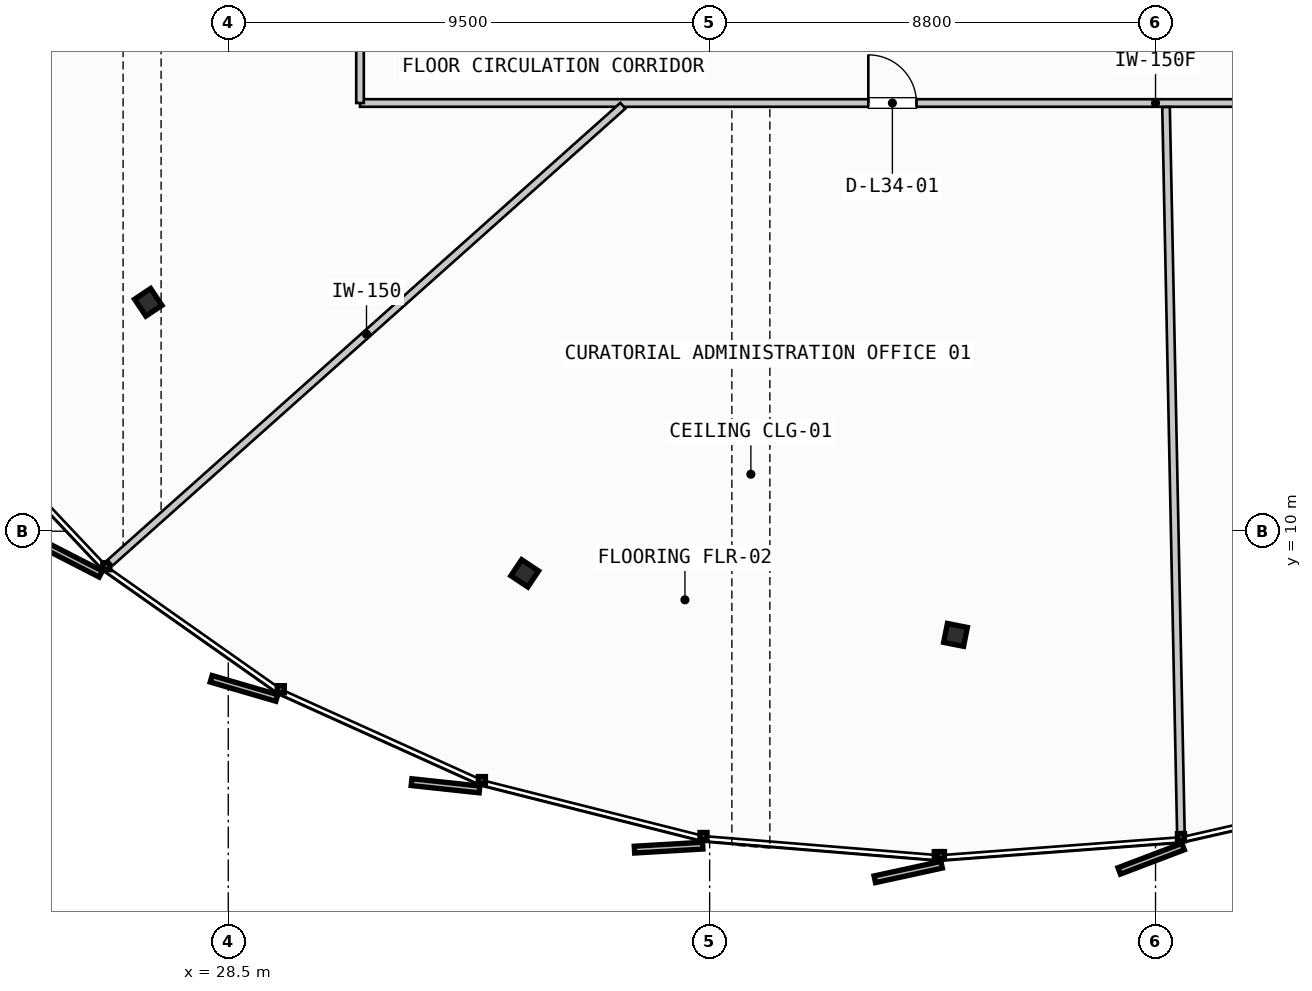
"""IFC4 building model, lengths in metres.
Left out: names, types, materials, properties, quantities, classifications, styles, units other than length and angle.
Written with IfcOpenShell. Run it as: python <this file> out.ifc"""

import sys

from ifc_helpers import new_model, si_unit, direction, frame, frame_2d, origin, origin_2d, place, context, subcontext, project, spatial, rectangle, i_section, extrude, source, transform, mapped, element, fill, save


model = new_model("IFC4")
c1 = context("Model", 3, precision=1e-05, world=origin(), true_north=direction((0.0, 1.0)))
c2 = subcontext(c1, "Body", "Model", "MODEL_VIEW")
j1 = project(units=[si_unit("LENGTHUNIT", "METRE"), si_unit("PLANEANGLEUNIT", "RADIAN")], contexts=[c1])
p1 = place(None, origin())
s1 = spatial("IfcSite", under=j1, at=p1, CompositionType="ELEMENT")
p2 = place(p1, origin())
s2 = spatial("IfcBuilding", under=s1, at=p2, CompositionType="ELEMENT")
p3 = place(p2, frame((0.0, 0.0, 135.9)))
s3 = spatial("IfcBuildingStorey", under=s2, at=p3, CompositionType="ELEMENT", Elevation=135.9)
m1 = source(origin(), c2, "Body", "SweptSolid", [
    extrude(i_section(OverallWidth=0.401, OverallDepth=0.381, WebThickness=0.032, FlangeThickness=0.051, FilletRadius=0.015, at=origin_2d()), origin(), (0.0, 0.0, 1.0), 3.3),
])
for number, where, z_axis, x_axis in (
    (1, (26.921, 14.517, 0.0), (0.0, 0.0, 1.0), (-0.831, -0.556, 0.0)),
    (2, (34.351, 9.168, 0.0), (0.0, 0.0, 1.0), (-0.556, -0.831, 0.0)),
    (3, (42.852, 7.954, 0.0), (0.0, 0.0, 1.0), (-0.195, -0.981, 0.0)),
):
    element("IfcColumn", number, at=place(p3, frame(where, z_axis=z_axis, x_axis=x_axis)), inside=s3, PredefinedType="COLUMN", context=c2, shape_type="MappedRepresentation", body=[
        mapped(m1, transform((0.0, 0.0, 0.0), scale=1.0)),
    ])
p4 = place(p3, frame((31.1, 18.45, 0.0), z_axis=(0.0, 0.0, 1.0), x_axis=(1.0, 0.0, 0.0)))
e4 = element("IfcWall", 4, at=p4, inside=s3, PredefinedType="PARTITIONING", context=c2, shape_type="SweptSolid", body=[
    extrude(rectangle(XDim=31.4, YDim=0.15, at=frame_2d((15.7, 0.0))), origin(), (0.0, 0.0, 1.0), 2.445),
])
p5 = place(p4, frame((10.031, 0.0, 0.0)))
e5 = element("IfcOpeningElement", 5, at=p5, cuts=e4, PredefinedType="OPENING", context=c2, shape_type="SweptSolid", body=[
    extrude(rectangle(XDim=0.95, YDim=2.15, at=frame_2d((0.475, 1.075))), frame((0.0, 0.085, 0.0), z_axis=(0.0, -1.0, 0.0), x_axis=(1.0, 0.0, 0.0)), (0.0, 0.0, 1.0), 0.17),
])
p6 = place(p4, frame((20.854, 0.0, 0.0)))
e6 = element("IfcOpeningElement", 6, at=p6, cuts=e4, PredefinedType="OPENING", context=c2, shape_type="SweptSolid", body=[
    extrude(rectangle(XDim=0.95, YDim=2.15, at=frame_2d((0.475, 1.075))), frame((0.0, 0.085, 0.0), z_axis=(0.0, -1.0, 0.0), x_axis=(1.0, 0.0, 0.0)), (0.0, 0.0, 1.0), 0.17),
])
p7 = place(p3, frame((31.1, 20.15, 0.0), z_axis=(0.0, 0.0, 1.0), x_axis=(0.0, -1.0, 0.0)))
e7 = element("IfcWall", 7, at=p7, inside=s3, PredefinedType="PARTITIONING", context=c2, shape_type="SweptSolid", body=[
    extrude(rectangle(XDim=1.7, YDim=0.15, at=frame_2d((0.85, 0.0))), origin(), (0.0, 0.0, 1.0), 2.445),
])
p8 = place(p3, frame((36.288, 18.397, 0.0), z_axis=(0.0, 0.0, 1.0), x_axis=(-0.746524355817, -0.66535808868, 0.0)))
e8 = element("IfcWall", 8, at=p8, inside=s3, PredefinedType="PARTITIONING", context=c2, shape_type="SweptSolid", body=[
    extrude(rectangle(XDim=13.557, YDim=0.15, at=frame_2d((6.778, 0.0))), origin(), (0.0, 0.0, 1.0), 2.445),
])
p9 = place(p3, frame((47.007, 18.37, 0.0), z_axis=(0.0, 0.0, 1.0), x_axis=(0.020469333541, -0.999790481243, 0.0)))
e9 = element("IfcWall", 9, at=p9, inside=s3, PredefinedType="PARTITIONING", context=c2, shape_type="SweptSolid", body=[
    extrude(rectangle(XDim=14.312, YDim=0.15, at=frame_2d((7.156, 0.0))), origin(), (0.0, 0.0, 1.0), 2.445),
])
m2 = source(origin(), c2, "Body", "SweptSolid", [
    extrude(rectangle(XDim=0.95, YDim=2.15, at=frame_2d((0.475, 1.075))), frame((0.0, 0.025, 0.0), z_axis=(0.0, -1.0, 0.0), x_axis=(1.0, 0.0, 0.0)), (0.0, 0.0, 1.0), 0.05),
])
p10 = place(p5, origin())
e10 = element("IfcDoor", 10, at=p10, inside=s3, OperationType="SINGLE_SWING_LEFT", PredefinedType="DOOR", context=c2, shape_type="MappedRepresentation", body=[
    mapped(m2, transform((0.0, 0.0, 0.0), scale=1.0)),
])
fill(e5, e10)
save(model, sys.argv[1])
